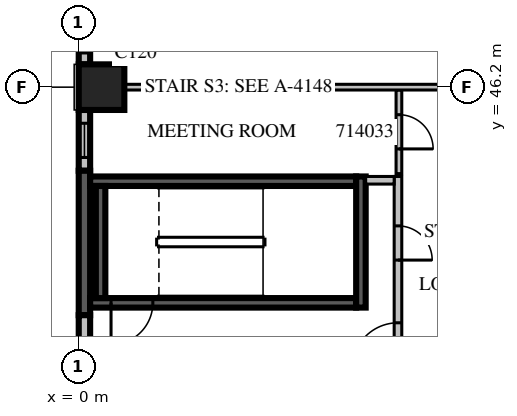
"""IFC4 building model, lengths in metres.
Left out: names, types, materials, properties, quantities, classifications, styles, units other than length and angle.
Written with IfcOpenShell. Run it as: python <this file> out.ifc"""

import sys

from ifc_helpers import new_model, si_unit, direction, frame, frame_2d, origin, origin_2d, place, context, subcontext, project, spatial, rectangle, extrude, source, transform, mapped, element, fill, save


model = new_model("IFC4")
c1 = context("Model", 3, precision=1e-05, world=origin(), true_north=direction((0.0, 1.0)))
c2 = subcontext(c1, "Body", "Model", "MODEL_VIEW")
j1 = project(units=[si_unit("LENGTHUNIT", "METRE"), si_unit("PLANEANGLEUNIT", "RADIAN")], contexts=[c1])
p1 = place(None, origin())
s1 = spatial("IfcSite", under=j1, at=p1, CompositionType="ELEMENT")
p2 = place(p1, origin())
s2 = spatial("IfcBuilding", under=s1, at=p2, CompositionType="ELEMENT")
p3 = place(p2, frame((0.0, 0.0, 69.9)))
s3 = spatial("IfcBuildingStorey", under=s2, at=p3, CompositionType="ELEMENT", Elevation=69.9)
m1 = source(origin(), c2, "Body", "SweptSolid", [
    extrude(rectangle(XDim=1.2, YDim=1.2, at=origin_2d()), origin(), (0.0, 0.0, 1.0), 4.2),
])
p4 = place(p3, frame((0.6, 46.2, 0.0), z_axis=(0.0, 0.0, 1.0), x_axis=(1.0, 0.0, 0.0)))
e1 = element("IfcColumn", 1, at=p4, inside=s3, PredefinedType="COLUMN", context=c2, shape_type="MappedRepresentation", body=[
    mapped(m1, transform((0.0, 0.0, 0.0), scale=1.0)),
])
m2 = source(origin(), c2, "Body", "SweptSolid", [
    extrude(rectangle(XDim=4.68, YDim=0.3, at=frame_2d((2.34, 0.0))), origin(), (0.0, 0.0, 1.0), 3.8),
])
p5 = place(p3, frame((0.15, 51.48, 0.0), z_axis=(0.0, 0.0, 1.0), x_axis=(0.0, -1.0, 0.0)))
e2 = element("IfcWall", 2, at=p5, inside=s3, PredefinedType="STANDARD", context=c2, shape_type="MappedRepresentation", body=[
    mapped(m2, transform((0.0, 0.0, 0.0), scale=1.0)),
])
m3 = source(origin(), c2, "Body", "SweptSolid", [
    extrude(rectangle(XDim=2.4, YDim=2.7, at=frame_2d((1.2, 1.35))), frame((0.0, 0.16, 0.0), z_axis=(0.0, -1.0, 0.0), x_axis=(1.0, 0.0, 0.0)), (0.0, 0.0, 1.0), 0.32),
])
p6 = place(p5, frame((1.98, 0.0, 0.6)))
e3 = element("IfcOpeningElement", 3, at=p6, cuts=e2, PredefinedType="OPENING", context=c2, shape_type="MappedRepresentation", body=[
    mapped(m3, transform((0.0, 0.0, 0.0), scale=1.0)),
])
m4 = source(origin(), c2, "Body", "SweptSolid", [
    extrude(rectangle(XDim=1.6, YDim=0.3, at=frame_2d((0.8, 0.0))), origin(), (0.0, 0.0, 1.0), 3.8),
])
p7 = place(p3, frame((0.15, 45.6, 0.0), z_axis=(0.0, 0.0, 1.0), x_axis=(0.0, -1.0, 0.0)))
e4 = element("IfcWall", 4, at=p7, inside=s3, PredefinedType="STANDARD", context=c2, shape_type="MappedRepresentation", body=[
    mapped(m4, transform((0.0, 0.0, 0.0), scale=1.0)),
])
m5 = source(origin(), c2, "Body", "SweptSolid", [
    extrude(rectangle(XDim=0.9, YDim=2.7, at=frame_2d((0.45, 1.35))), frame((0.0, 0.16, 0.0), z_axis=(0.0, -1.0, 0.0), x_axis=(1.0, 0.0, 0.0)), (0.0, 0.0, 1.0), 0.32),
])
p8 = place(p7, frame((0.35, 0.0, 0.6)))
e5 = element("IfcOpeningElement", 5, at=p8, cuts=e4, PredefinedType="OPENING", context=c2, shape_type="MappedRepresentation", body=[
    mapped(m5, transform((0.0, 0.0, 0.0), scale=1.0)),
])
m6 = source(origin(), c2, "Body", "SweptSolid", [
    extrude(rectangle(XDim=3.8, YDim=0.3, at=frame_2d((1.9, 0.0))), origin(), (0.0, 0.0, 1.0), 3.8),
])
p9 = place(p3, frame((0.15, 44.0, 0.0), z_axis=(0.0, 0.0, 1.0), x_axis=(0.0, -1.0, 0.0)))
e6 = element("IfcWall", 6, at=p9, inside=s3, PredefinedType="SOLIDWALL", context=c2, shape_type="MappedRepresentation", body=[
    mapped(m6, transform((0.0, 0.0, 0.0), scale=1.0)),
])
m7 = source(origin(), c2, "Body", "SweptSolid", [
    extrude(rectangle(XDim=1.2, YDim=0.3, at=frame_2d((0.6, 0.0))), origin(), (0.0, 0.0, 1.0), 3.8),
])
p10 = place(p3, frame((0.15, 40.2, 0.0), z_axis=(0.0, 0.0, 1.0), x_axis=(0.0, -1.0, 0.0)))
e7 = element("IfcWall", 7, at=p10, inside=s3, PredefinedType="STANDARD", context=c2, shape_type="MappedRepresentation", body=[
    mapped(m7, transform((0.0, 0.0, 0.0), scale=1.0)),
])
m8 = source(origin(), c2, "Body", "SweptSolid", [
    extrude(rectangle(XDim=7.0, YDim=0.25, at=frame_2d((3.5, 0.0))), origin(), (0.0, 0.0, 1.0), 3.8),
])
p11 = place(p3, frame((0.3, 40.525, 0.0), z_axis=(0.0, 0.0, 1.0), x_axis=(1.0, 0.0, 0.0)))
e8 = element("IfcWall", 8, at=p11, inside=s3, PredefinedType="SOLIDWALL", context=c2, shape_type="MappedRepresentation", body=[
    mapped(m8, transform((0.0, 0.0, 0.0), scale=1.0)),
])
m9 = source(origin(), c2, "Body", "SweptSolid", [
    extrude(rectangle(XDim=1.1, YDim=2.1, at=frame_2d((0.55, 1.05))), frame((0.0, 0.135, 0.0), z_axis=(0.0, -1.0, 0.0), x_axis=(1.0, 0.0, 0.0)), (0.0, 0.0, 1.0), 0.27),
])
p12 = place(p11, frame((0.55, 0.0, 0.0)))
e9 = element("IfcOpeningElement", 9, at=p12, cuts=e8, PredefinedType="OPENING", context=c2, shape_type="MappedRepresentation", body=[
    mapped(m9, transform((0.0, 0.0, 0.0), scale=1.0)),
])
p13 = place(p3, frame((0.3, 43.725, 0.0), z_axis=(0.0, 0.0, 1.0), x_axis=(1.0, 0.0, 0.0)))
e10 = element("IfcWall", 10, at=p13, inside=s3, PredefinedType="SOLIDWALL", context=c2, shape_type="MappedRepresentation", body=[
    mapped(m8, transform((0.0, 0.0, 0.0), scale=1.0)),
])
m10 = source(origin(), c2, "Body", "SweptSolid", [
    extrude(rectangle(XDim=3.45, YDim=0.25, at=frame_2d((1.725, 0.0))), origin(), (0.0, 0.0, 1.0), 3.8),
])
p14 = place(p3, frame((7.425, 40.4, 0.0), z_axis=(0.0, 0.0, 1.0), x_axis=(0.0, 1.0, 0.0)))
e11 = element("IfcWall", 11, at=p14, inside=s3, PredefinedType="SOLIDWALL", context=c2, shape_type="MappedRepresentation", body=[
    mapped(m10, transform((0.0, 0.0, 0.0), scale=1.0)),
])
m11 = source(origin(), c2, "Body", "SweptSolid", [
    extrude(rectangle(XDim=2.95, YDim=0.25, at=frame_2d((1.475, 0.0))), origin(), (0.0, 0.0, 1.0), 3.8),
])
p15 = place(p3, frame((0.575, 40.65, 0.0), z_axis=(0.0, 0.0, 1.0), x_axis=(0.0, 1.0, 0.0)))
e12 = element("IfcWall", 12, at=p15, inside=s3, PredefinedType="SOLIDWALL", context=c2, shape_type="MappedRepresentation", body=[
    mapped(m11, transform((0.0, 0.0, 0.0), scale=1.0)),
])
m12 = source(origin(), c2, "Body", "SweptSolid", [
    extrude(rectangle(XDim=5.45, YDim=0.2, at=frame_2d((2.725, 0.0))), origin(), (0.0, 0.0, 1.0), 3.8),
])
p16 = place(p3, frame((8.4, 38.4, 0.0), z_axis=(0.0, 0.0, 1.0), x_axis=(0.0, 1.0, 0.0)))
e13 = element("IfcWall", 13, at=p16, inside=s3, PredefinedType="PARTITIONING", context=c2, shape_type="MappedRepresentation", body=[
    mapped(m12, transform((0.0, 0.0, 0.0), scale=1.0)),
])
m13 = source(origin(), c2, "Body", "SweptSolid", [
    extrude(rectangle(XDim=1.2, YDim=2.1, at=frame_2d((0.6, 1.05))), frame((0.0, 0.11, 0.0), z_axis=(0.0, -1.0, 0.0), x_axis=(1.0, 0.0, 0.0)), (0.0, 0.0, 1.0), 0.22),
])
p17 = place(p16, frame((0.4, 0.0, 0.0)))
e14 = element("IfcOpeningElement", 14, at=p17, cuts=e13, PredefinedType="OPENING", context=c2, shape_type="MappedRepresentation", body=[
    mapped(m13, transform((0.0, 0.0, 0.0), scale=1.0)),
])
m14 = source(origin(), c2, "Body", "SweptSolid", [
    extrude(rectangle(XDim=0.9, YDim=2.1, at=frame_2d((0.45, 1.05))), frame((0.0, 0.11, 0.0), z_axis=(0.0, -1.0, 0.0), x_axis=(1.0, 0.0, 0.0)), (0.0, 0.0, 1.0), 0.22),
])
p18 = place(p16, frame((3.25, 0.0, 0.0)))
e15 = element("IfcOpeningElement", 15, at=p18, cuts=e13, PredefinedType="OPENING", context=c2, shape_type="MappedRepresentation", body=[
    mapped(m14, transform((0.0, 0.0, 0.0), scale=1.0)),
])
m15 = source(origin(), c2, "Body", "SweptSolid", [
    extrude(rectangle(XDim=0.75, YDim=0.2, at=frame_2d((0.375, 0.0))), origin(), (0.0, 0.0, 1.0), 3.8),
])
p19 = place(p3, frame((7.55, 43.75, 0.0), z_axis=(0.0, 0.0, 1.0), x_axis=(1.0, 0.0, 0.0)))
e16 = element("IfcWall", 16, at=p19, inside=s3, PredefinedType="PARTITIONING", context=c2, shape_type="MappedRepresentation", body=[
    mapped(m15, transform((0.0, 0.0, 0.0), scale=1.0)),
])
m16 = source(origin(), c2, "Body", "SweptSolid", [
    extrude(rectangle(XDim=2.2, YDim=0.15, at=frame_2d((1.1, 0.0))), origin(), (0.0, 0.0, 1.0), 3.8),
])
p20 = place(p3, frame((8.425, 43.925, 0.0), z_axis=(0.0, 0.0, 1.0), x_axis=(0.0, 1.0, 0.0)))
e17 = element("IfcWall", 17, at=p20, inside=s3, PredefinedType="PARTITIONING", context=c2, shape_type="MappedRepresentation", body=[
    mapped(m16, transform((0.0, 0.0, 0.0), scale=1.0)),
])
m17 = source(origin(), c2, "Body", "SweptSolid", [
    extrude(rectangle(XDim=0.9, YDim=2.1, at=frame_2d((0.45, 1.05))), frame((0.0, 0.085, 0.0), z_axis=(0.0, -1.0, 0.0), x_axis=(1.0, 0.0, 0.0)), (0.0, 0.0, 1.0), 0.17),
])
p21 = place(p20, frame((0.65, 0.0, 0.0)))
e18 = element("IfcOpeningElement", 18, at=p21, cuts=e17, PredefinedType="OPENING", context=c2, shape_type="MappedRepresentation", body=[
    mapped(m17, transform((0.0, 0.0, 0.0), scale=1.0)),
])
m18 = source(origin(), c2, "Body", "SweptSolid", [
    extrude(rectangle(XDim=8.702, YDim=0.15, at=frame_2d((4.351, 0.0))), origin(), (0.0, 0.0, 1.0), 3.8),
])
p22 = place(p3, frame((9.901, 46.2, 0.0), z_axis=(0.0, 0.0, 1.0), x_axis=(-1.0, 0.0, 0.0)))
e19 = element("IfcWall", 19, at=p22, inside=s3, PredefinedType="PARTITIONING", context=c2, shape_type="MappedRepresentation", body=[
    mapped(m18, transform((0.0, 0.0, 0.0), scale=1.0)),
])
m19 = source(origin(), c2, "Body", "SweptSolid", [
    extrude(rectangle(XDim=2.4, YDim=2.7, at=frame_2d((1.2, 1.35))), frame((0.0, 0.03, 0.0), z_axis=(0.0, -1.0, 0.0), x_axis=(1.0, 0.0, 0.0)), (0.0, 0.0, 1.0), 0.06),
])
p23 = place(p6, origin())
e20 = element("IfcWindow", 20, at=p23, inside=s3, PartitioningType="SINGLE_PANEL", PredefinedType="WINDOW", context=c2, shape_type="MappedRepresentation", body=[
    mapped(m19, transform((0.0, 0.0, 0.0), scale=1.0)),
])
fill(e3, e20)
m20 = source(origin(), c2, "Body", "SweptSolid", [
    extrude(rectangle(XDim=0.9, YDim=2.7, at=frame_2d((0.45, 1.35))), frame((0.0, 0.03, 0.0), z_axis=(0.0, -1.0, 0.0), x_axis=(1.0, 0.0, 0.0)), (0.0, 0.0, 1.0), 0.06),
])
p24 = place(p8, origin())
e21 = element("IfcWindow", 21, at=p24, inside=s3, PartitioningType="SINGLE_PANEL", PredefinedType="WINDOW", context=c2, shape_type="MappedRepresentation", body=[
    mapped(m20, transform((0.0, 0.0, 0.0), scale=1.0)),
])
fill(e5, e21)
m21 = source(origin(), c2, "Body", "SweptSolid", [
    extrude(rectangle(XDim=1.1, YDim=2.1, at=frame_2d((0.55, 1.05))), frame((0.0, 0.025, 0.0), z_axis=(0.0, -1.0, 0.0), x_axis=(1.0, 0.0, 0.0)), (0.0, 0.0, 1.0), 0.05),
])
p25 = place(p12, origin())
e22 = element("IfcDoor", 22, at=p25, inside=s3, OperationType="SINGLE_SWING_RIGHT", PredefinedType="DOOR", context=c2, shape_type="MappedRepresentation", body=[
    mapped(m21, transform((0.0, 0.0, 0.0), scale=1.0)),
])
fill(e9, e22)
m22 = source(origin(), c2, "Body", "SweptSolid", [
    extrude(rectangle(XDim=1.2, YDim=2.1, at=frame_2d((0.6, 1.05))), frame((0.0, 0.025, 0.0), z_axis=(0.0, -1.0, 0.0), x_axis=(1.0, 0.0, 0.0)), (0.0, 0.0, 1.0), 0.05),
])
p26 = place(p17, origin())
e23 = element("IfcDoor", 23, at=p26, inside=s3, OperationType="SINGLE_SWING_LEFT", PredefinedType="DOOR", context=c2, shape_type="MappedRepresentation", body=[
    mapped(m22, transform((0.0, 0.0, 0.0), scale=1.0)),
])
fill(e14, e23)
m23 = source(origin(), c2, "Body", "SweptSolid", [
    extrude(rectangle(XDim=0.9, YDim=2.1, at=frame_2d((0.45, 1.05))), frame((0.0, 0.025, 0.0), z_axis=(0.0, -1.0, 0.0), x_axis=(1.0, 0.0, 0.0)), (0.0, 0.0, 1.0), 0.05),
])
p27 = place(p18, origin())
e24 = element("IfcDoor", 24, at=p27, inside=s3, OperationType="SINGLE_SWING_RIGHT", PredefinedType="DOOR", context=c2, shape_type="MappedRepresentation", body=[
    mapped(m23, transform((0.0, 0.0, 0.0), scale=1.0)),
])
fill(e15, e24)
p28 = place(p21, origin())
e25 = element("IfcDoor", 25, at=p28, inside=s3, OperationType="SINGLE_SWING_RIGHT", PredefinedType="DOOR", context=c2, shape_type="MappedRepresentation", body=[
    mapped(m23, transform((0.0, 0.0, 0.0), scale=1.0)),
])
fill(e18, e25)
save(model, sys.argv[1])
